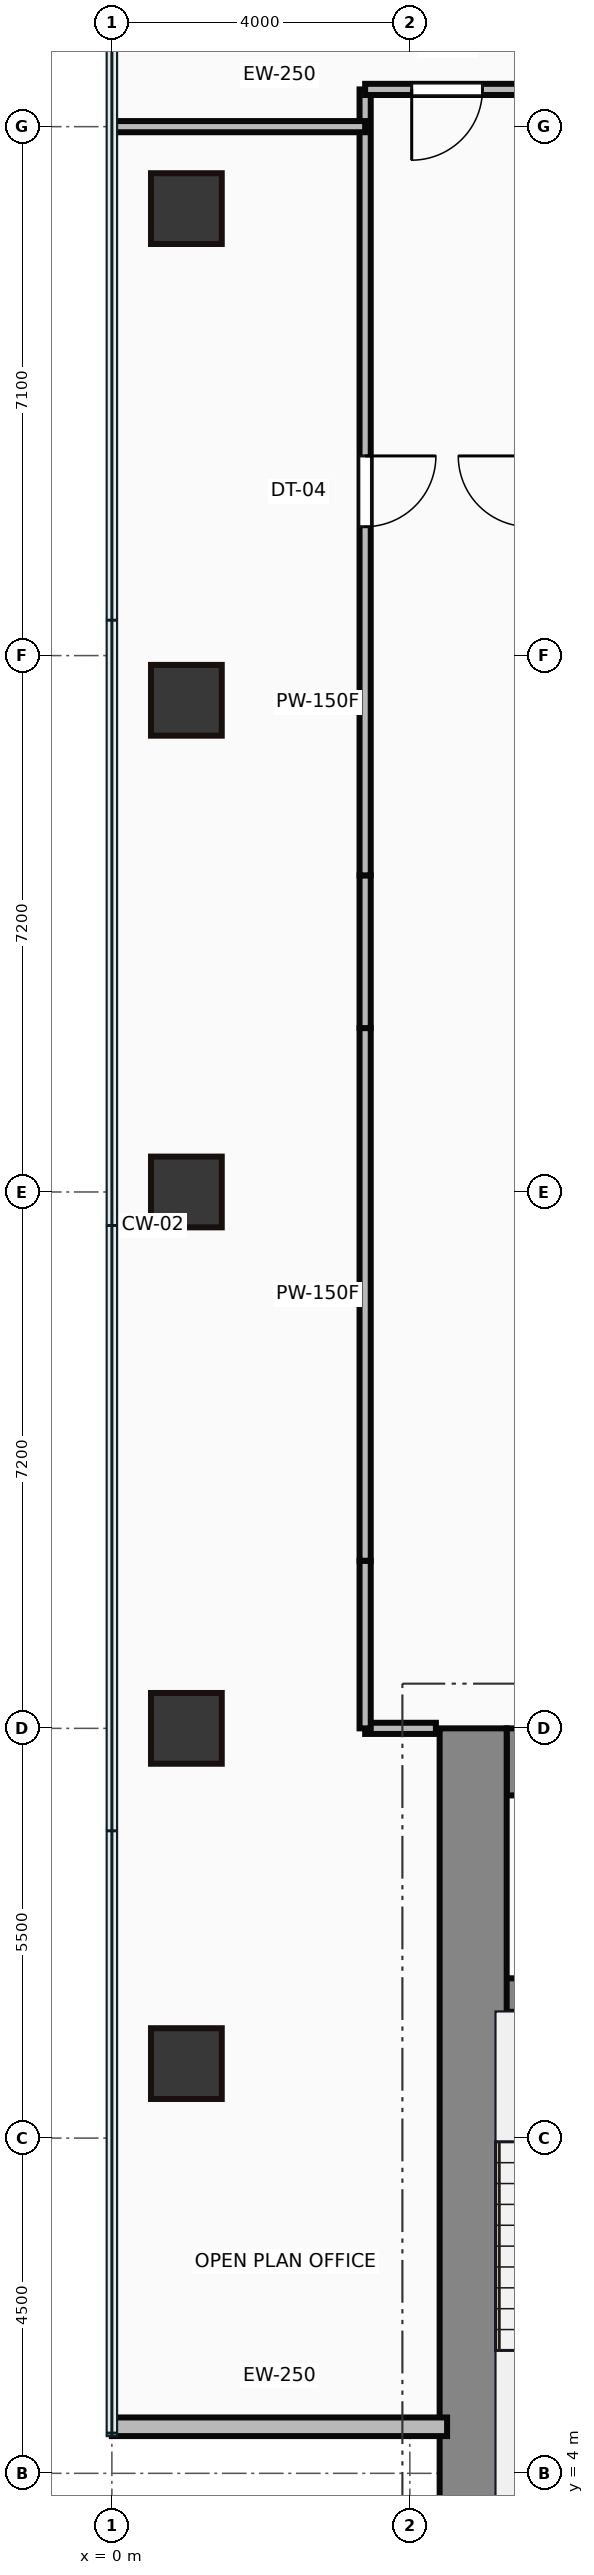
"""IFC4 building model, lengths in metres.
Left out: names, types, materials, properties, quantities, classifications, styles, units other than length and angle.
Written with IfcOpenShell. Run it as: python <this file> out.ifc"""

import sys

from ifc_helpers import new_model, si_unit, direction, frame, frame_2d, origin, origin_2d, place, context, subcontext, project, spatial, rectangle, hollow_rectangle, extrude, source, transform, mapped, element, fill, save


model = new_model("IFC4")
c1 = context("Model", 3, precision=1e-05, world=origin(), true_north=direction((0.0, 1.0)))
c2 = subcontext(c1, "Body", "Model", "MODEL_VIEW")
j1 = project(units=[si_unit("LENGTHUNIT", "METRE"), si_unit("PLANEANGLEUNIT", "RADIAN")], contexts=[c1])
p1 = place(None, origin())
s1 = spatial("IfcSite", under=j1, at=p1, CompositionType="ELEMENT")
p2 = place(p1, origin())
s2 = spatial("IfcBuilding", under=s1, at=p2, CompositionType="ELEMENT")
p3 = place(p2, frame((0.0, 0.0, 50.75)))
s3 = spatial("IfcBuildingStorey", under=s2, at=p3, CompositionType="ELEMENT", Elevation=50.75)
m1 = source(origin(), c2, "Body", "SweptSolid", [
    extrude(rectangle(XDim=13.1, YDim=0.9, at=frame_2d((6.55, 0.0))), origin(), (0.0, 0.0, 1.0), 3.65),
])
p4 = place(p3, frame((4.85, 0.9, 0.0), z_axis=(0.0, 0.0, 1.0), x_axis=(0.0, 1.0, 0.0)))
e1 = element("IfcWall", 1, at=p4, inside=s3, PredefinedType="SHEAR", context=c2, shape_type="MappedRepresentation", body=[
    mapped(m1, transform((0.0, 0.0, 0.0))),
])
m2 = source(origin(), c2, "Body", "SweptSolid", [
    extrude(rectangle(XDim=9.1, YDim=0.9, at=frame_2d((4.55, 0.0))), origin(), (0.0, 0.0, 1.0), 3.65),
])
p5 = place(p3, frame((5.3, 13.55, 0.0), z_axis=(0.0, 0.0, 1.0), x_axis=(1.0, 0.0, 0.0)))
e2 = element("IfcWall", 2, at=p5, inside=s3, PredefinedType="SHEAR", context=c2, shape_type="MappedRepresentation", body=[
    mapped(m2, transform((0.0, 0.0, 0.0))),
])
p6 = place(p5, frame((4.1, 0.0, 0.0)))
e3 = element("IfcOpeningElement", 3, at=p6, cuts=e2, PredefinedType="OPENING", context=c2, shape_type="SweptSolid", body=[
    extrude(rectangle(XDim=1.1, YDim=2.15, at=frame_2d((0.55, 1.075))), frame((0.0, 0.46, 0.0), z_axis=(0.0, -1.0, 0.0), x_axis=(1.0, 0.0, 0.0)), (0.0, 0.0, 1.0), 0.92),
])
m3 = source(origin(), c2, "Body", "SweptSolid", [
    extrude(rectangle(XDim=3.39, YDim=0.45, at=frame_2d((1.695, 0.0))), origin(), (0.0, 0.0, 1.0), 3.65),
])
p7 = place(p3, frame((5.25, 10.42, 0.0), z_axis=(0.0, 0.0, 1.0), x_axis=(1.0, 0.0, 0.0)))
e4 = element("IfcWall", 4, at=p7, inside=s3, PredefinedType="SHEAR", context=c2, shape_type="MappedRepresentation", body=[
    mapped(m3, transform((0.0, 0.0, 0.0))),
])
p8 = place(p7, frame((1.05, 0.0, 0.0)))
e5 = element("IfcOpeningElement", 5, at=p8, cuts=e4, PredefinedType="OPENING", context=c2, shape_type="SweptSolid", body=[
    extrude(rectangle(XDim=1.1, YDim=2.15, at=frame_2d((0.55, 1.075))), frame((0.0, 0.235, 0.0), z_axis=(0.0, -1.0, 0.0), x_axis=(1.0, 0.0, 0.0)), (0.0, 0.0, 1.0), 0.47),
])
m4 = source(origin(), c2, "Body", "SweptSolid", [
    extrude(hollow_rectangle(XDim=0.95, YDim=0.95, WallThickness=0.045, at=origin_2d()), origin(), (0.0, 0.0, 1.0), 3.65),
])
for number, where, z_axis, x_axis in (
    (6, (1.0, 9.5, 0.0), (0.0, 0.0, 1.0), (1.0, 0.0, 0.0)),
    (7, (1.0, 14.0, 0.0), (0.0, 0.0, 1.0), (1.0, 0.0, 0.0)),
    (8, (1.0, 21.2, 0.0), (0.0, 0.0, 1.0), (1.0, 0.0, 0.0)),
    (9, (1.0, 27.8, 0.0), (0.0, 0.0, 1.0), (1.0, 0.0, 0.0)),
    (10, (1.0, 34.4, 0.0), (0.0, 0.0, 1.0), (1.0, 0.0, 0.0)),
):
    element("IfcColumn", number, at=place(p3, frame(where, z_axis=z_axis, x_axis=x_axis)), inside=s3, PredefinedType="COLUMN", context=c2, shape_type="MappedRepresentation", body=[
        mapped(m4, transform((0.0, 0.0, 0.0))),
    ])
m5 = source(origin(), c2, "Body", "SweptSolid", [
    extrude(rectangle(XDim=4.5, YDim=0.25, at=frame_2d((2.25, 0.0))), origin(), (0.0, 0.0, 1.0), 3.4),
])
p9 = place(p3, frame((0.0, 4.625, 0.0), z_axis=(0.0, 0.0, 1.0), x_axis=(1.0, 0.0, 0.0)))
e11 = element("IfcWall", 11, at=p9, inside=s3, PredefinedType="STANDARD", context=c2, shape_type="MappedRepresentation", body=[
    mapped(m5, transform((0.0, 0.0, 0.0))),
])
m6 = source(origin(), c2, "Body", "SweptSolid", [
    extrude(rectangle(XDim=0.95, YDim=0.15, at=frame_2d((0.475, 0.0))), origin(), (0.0, 0.0, 1.0), 2.625),
])
p10 = place(p3, frame((4.35, 14.0, 0.0), z_axis=(0.0, 0.0, 1.0), x_axis=(-1.0, 0.0, 0.0)))
e12 = element("IfcWall", 12, at=p10, inside=s3, PredefinedType="PARTITIONING", context=c2, shape_type="MappedRepresentation", body=[
    mapped(m6, transform((0.0, 0.0, 0.0))),
])
m7 = source(origin(), c2, "Body", "SweptSolid", [
    extrude(rectangle(XDim=2.25, YDim=0.15, at=frame_2d((1.125, 0.0))), origin(), (0.0, 0.0, 1.0), 3.4),
])
p11 = place(p3, frame((3.4, 14.0, 0.0), z_axis=(0.0, 0.0, 1.0), x_axis=(0.0, 1.0, 0.0)))
e13 = element("IfcWall", 13, at=p11, inside=s3, PredefinedType="PARTITIONING", context=c2, shape_type="MappedRepresentation", body=[
    mapped(m7, transform((0.0, 0.0, 0.0))),
])
m8 = source(origin(), c2, "Body", "SweptSolid", [
    extrude(rectangle(XDim=7.15, YDim=0.15, at=frame_2d((3.575, 0.0))), origin(), (0.0, 0.0, 1.0), 3.4),
])
p12 = place(p3, frame((3.4, 16.25, 0.0), z_axis=(0.0, 0.0, 1.0), x_axis=(0.0, 1.0, 0.0)))
e14 = element("IfcWall", 14, at=p12, inside=s3, PredefinedType="PARTITIONING", context=c2, shape_type="MappedRepresentation", body=[
    mapped(m8, transform((0.0, 0.0, 0.0))),
])
m9 = source(origin(), c2, "Body", "SweptSolid", [
    extrude(rectangle(XDim=2.05, YDim=0.15, at=frame_2d((1.025, 0.0))), origin(), (0.0, 0.0, 1.0), 3.4),
])
p13 = place(p3, frame((3.4, 23.4, 0.0), z_axis=(0.0, 0.0, 1.0), x_axis=(0.0, 1.0, 0.0)))
e15 = element("IfcWall", 15, at=p13, inside=s3, PredefinedType="PARTITIONING", context=c2, shape_type="MappedRepresentation", body=[
    mapped(m9, transform((0.0, 0.0, 0.0))),
])
m10 = source(origin(), c2, "Body", "SweptSolid", [
    extrude(rectangle(XDim=10.55, YDim=0.15, at=frame_2d((5.275, 0.0))), origin(), (0.0, 0.0, 1.0), 3.4),
])
p14 = place(p3, frame((3.4, 25.45, 0.0), z_axis=(0.0, 0.0, 1.0), x_axis=(0.0, 1.0, 0.0)))
e16 = element("IfcWall", 16, at=p14, inside=s3, PredefinedType="PARTITIONING", context=c2, shape_type="MappedRepresentation", body=[
    mapped(m10, transform((0.0, 0.0, 0.0))),
])
p15 = place(p14, frame((4.68, 0.0, 0.0)))
e17 = element("IfcOpeningElement", 17, at=p15, cuts=e16, PredefinedType="OPENING", context=c2, shape_type="SweptSolid", body=[
    extrude(rectangle(XDim=0.95, YDim=2.15, at=frame_2d((0.475, 1.075))), frame((0.0, 0.085, 0.0), z_axis=(0.0, -1.0, 0.0), x_axis=(1.0, 0.0, 0.0)), (0.0, 0.0, 1.0), 0.17),
])
m11 = source(origin(), c2, "Body", "SweptSolid", [
    extrude(rectangle(XDim=2.2, YDim=0.15, at=frame_2d((1.1, 0.0))), origin(), (0.0, 0.0, 1.0), 3.4),
])
p16 = place(p3, frame((3.4, 36.0, 0.0), z_axis=(0.0, 0.0, 1.0), x_axis=(1.0, 0.0, 0.0)))
e18 = element("IfcWall", 18, at=p16, inside=s3, PredefinedType="PARTITIONING", context=c2, shape_type="MappedRepresentation", body=[
    mapped(m11, transform((0.0, 0.0, 0.0))),
])
p17 = place(p16, frame((0.625, 0.0, 0.0)))
e19 = element("IfcOpeningElement", 19, at=p17, cuts=e18, PredefinedType="OPENING", context=c2, shape_type="SweptSolid", body=[
    extrude(rectangle(XDim=0.95, YDim=2.15, at=frame_2d((0.475, 1.075))), frame((0.0, 0.085, 0.0), z_axis=(0.0, -1.0, 0.0), x_axis=(1.0, 0.0, 0.0)), (0.0, 0.0, 1.0), 0.17),
])
m12 = source(origin(), c2, "Body", "SweptSolid", [
    extrude(rectangle(XDim=3.38, YDim=0.15, at=frame_2d((1.69, 0.0))), origin(), (0.0, 0.0, 1.0), 3.4),
])
p18 = place(p3, frame((0.02, 35.5, 0.0), z_axis=(0.0, 0.0, 1.0), x_axis=(1.0, 0.0, 0.0)))
e20 = element("IfcWall", 20, at=p18, inside=s3, PredefinedType="PARTITIONING", context=c2, shape_type="MappedRepresentation", body=[
    mapped(m12, transform((0.0, 0.0, 0.0))),
])
m13 = source(origin(), c2, "Body", "SweptSolid", [
    extrude(rectangle(XDim=0.95, YDim=2.15, at=frame_2d((0.475, 1.075))), frame((0.0, 0.025, 0.0), z_axis=(0.0, -1.0, 0.0), x_axis=(1.0, 0.0, 0.0)), (0.0, 0.0, 1.0), 0.05),
])
p19 = place(p15, origin())
e21 = element("IfcDoor", 21, at=p19, inside=s3, OperationType="SINGLE_SWING_RIGHT", PredefinedType="DOOR", context=c2, shape_type="MappedRepresentation", body=[
    mapped(m13, transform((0.0, 0.0, 0.0))),
])
fill(e17, e21)
p20 = place(p17, origin())
e22 = element("IfcDoor", 22, at=p20, inside=s3, OperationType="SINGLE_SWING_LEFT", PredefinedType="DOOR", context=c2, shape_type="MappedRepresentation", body=[
    mapped(m13, transform((0.0, 0.0, 0.0))),
])
fill(e19, e22)
save(model, sys.argv[1])
